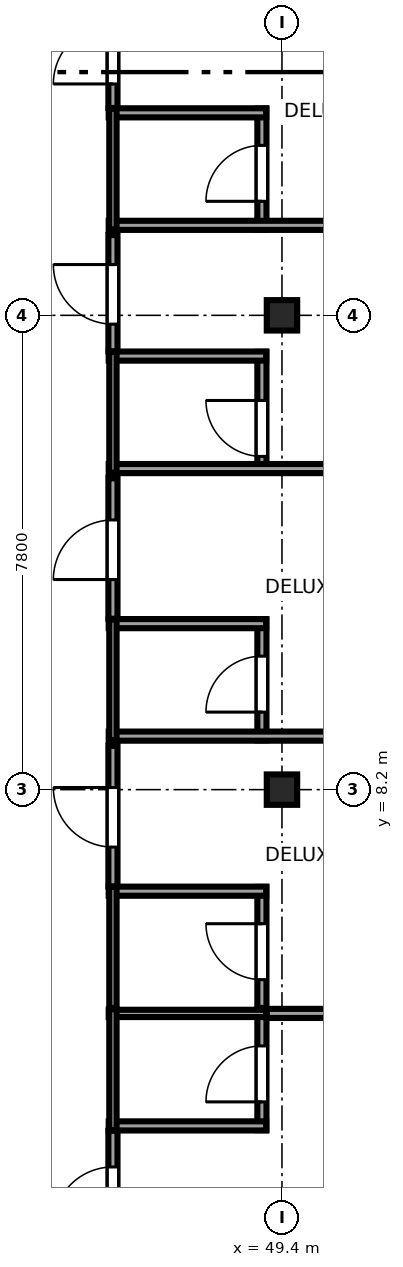
"""IFC4 building model, lengths in metres.
Left out: names, types, materials, properties, quantities, classifications, styles, units other than length and angle.
Written with IfcOpenShell. Run it as: python <this file> out.ifc"""

import sys

from ifc_helpers import new_model, si_unit, direction, frame, frame_2d, origin, origin_2d, place, context, subcontext, project, spatial, rectangle, i_section, extrude, source, transform, mapped, element, fill, save


model = new_model("IFC4")
c1 = context("Model", 3, precision=1e-05, world=origin(), true_north=direction((0.0, 1.0)))
c2 = subcontext(c1, "Body", "Model", "MODEL_VIEW")
j1 = project(units=[si_unit("LENGTHUNIT", "METRE"), si_unit("PLANEANGLEUNIT", "RADIAN")], contexts=[c1])
p1 = place(None, origin())
s1 = spatial("IfcSite", under=j1, at=p1, CompositionType="ELEMENT")
p2 = place(p1, origin())
s2 = spatial("IfcBuilding", under=s1, at=p2, CompositionType="ELEMENT")
p3 = place(p2, frame((0.0, 0.0, 32.0)))
s3 = spatial("IfcBuildingStorey", under=s2, at=p3, CompositionType="ELEMENT", Elevation=32.0)
m1 = source(origin(), c2, "Body", "SweptSolid", [
    extrude(i_section(OverallWidth=0.5, OverallDepth=0.5, WebThickness=0.028, FlangeThickness=0.045, at=origin_2d()), origin(), (0.0, 0.0, 1.0), 3.55),
])
for number, where, z_axis, x_axis in (
    (1, (49.4, 8.2, 0.0), (0.0, 0.0, 1.0), (1.0, 0.0, 0.0)),
    (2, (49.4, 16.0, 0.0), (0.0, 0.0, 1.0), (1.0, 0.0, 0.0)),
):
    element("IfcColumn", number, at=place(p3, frame(where, z_axis=z_axis, x_axis=x_axis)), inside=s3, PredefinedType="COLUMN", context=c2, shape_type="MappedRepresentation", body=[
        mapped(m1, transform((0.0, 0.0, 0.0), x_axis=(1.0, 0.0, 0.0), y_axis=(0.0, 1.0, 0.0), z_axis=(0.0, 0.0, 1.0), scale=1.0)),
    ])
p4 = place(p3, frame((49.07, 2.6, 0.0), z_axis=(0.0, 0.0, 1.0), x_axis=(0.0, 1.0, 0.0)))
e3 = element("IfcWall", 3, at=p4, inside=s3, PredefinedType="PARTITIONING", context=c2, shape_type="SweptSolid", body=[
    extrude(rectangle(XDim=1.99, YDim=0.15, at=frame_2d((0.995, 0.0))), origin(), (0.0, 0.0, 1.0), 3.37),
])
p5 = place(p4, frame((0.465, 0.0, 0.0)))
e4 = element("IfcOpeningElement", 4, at=p5, cuts=e3, PredefinedType="OPENING", context=c2, shape_type="SweptSolid", body=[
    extrude(rectangle(XDim=0.92, YDim=2.01, at=frame_2d((0.46, 1.005))), frame((0.0, 0.085, 0.0), z_axis=(0.0, -1.0, 0.0), x_axis=(1.0, 0.0, 0.0)), (0.0, 0.0, 1.0), 0.17),
])
p6 = place(p3, frame((46.55, 2.67, 0.0), z_axis=(0.0, 0.0, 1.0), x_axis=(1.0, 0.0, 0.0)))
e5 = element("IfcWall", 5, at=p6, inside=s3, PredefinedType="PARTITIONING", context=c2, shape_type="SweptSolid", body=[
    extrude(rectangle(XDim=2.59, YDim=0.15, at=frame_2d((1.295, 0.0))), origin(), (0.0, 0.0, 1.0), 3.37),
])
p7 = place(p3, frame((46.55, 4.52, 0.0), z_axis=(0.0, 0.0, 1.0), x_axis=(1.0, 0.0, 0.0)))
e6 = element("IfcWall", 6, at=p7, inside=s3, PredefinedType="PLUMBINGWALL", context=c2, shape_type="SweptSolid", body=[
    extrude(rectangle(XDim=2.59, YDim=0.12, at=frame_2d((1.295, 0.0))), origin(), (0.0, 0.0, 1.0), 3.37),
])
p8 = place(p3, frame((46.62, 2.6, 0.0), z_axis=(0.0, 0.0, 1.0), x_axis=(0.0, 1.0, 0.0)))
e7 = element("IfcWall", 7, at=p8, inside=s3, PredefinedType="PLUMBINGWALL", context=c2, shape_type="SweptSolid", body=[
    extrude(rectangle(XDim=1.99, YDim=0.12, at=frame_2d((0.995, 0.0))), origin(), (0.0, 0.0, 1.0), 3.37),
])
p9 = place(p3, frame((49.07, 4.61, 0.0), z_axis=(0.0, 0.0, 1.0), x_axis=(0.0, 1.0, 0.0)))
e8 = element("IfcWall", 8, at=p9, inside=s3, PredefinedType="PARTITIONING", context=c2, shape_type="SweptSolid", body=[
    extrude(rectangle(XDim=1.99, YDim=0.15, at=frame_2d((0.995, 0.0))), origin(), (0.0, 0.0, 1.0), 3.37),
])
p10 = place(p9, frame((0.465, 0.0, 0.0)))
e9 = element("IfcOpeningElement", 9, at=p10, cuts=e8, PredefinedType="OPENING", context=c2, shape_type="SweptSolid", body=[
    extrude(rectangle(XDim=0.92, YDim=2.01, at=frame_2d((0.46, 1.005))), frame((0.0, 0.085, 0.0), z_axis=(0.0, -1.0, 0.0), x_axis=(1.0, 0.0, 0.0)), (0.0, 0.0, 1.0), 0.17),
])
p11 = place(p3, frame((46.55, 6.53, 0.0), z_axis=(0.0, 0.0, 1.0), x_axis=(1.0, 0.0, 0.0)))
e10 = element("IfcWall", 10, at=p11, inside=s3, PredefinedType="PARTITIONING", context=c2, shape_type="SweptSolid", body=[
    extrude(rectangle(XDim=2.59, YDim=0.15, at=frame_2d((1.295, 0.0))), origin(), (0.0, 0.0, 1.0), 3.37),
])
p12 = place(p3, frame((46.62, 4.61, 0.0), z_axis=(0.0, 0.0, 1.0), x_axis=(0.0, 1.0, 0.0)))
e11 = element("IfcWall", 11, at=p12, inside=s3, PredefinedType="PLUMBINGWALL", context=c2, shape_type="SweptSolid", body=[
    extrude(rectangle(XDim=1.99, YDim=0.12, at=frame_2d((0.995, 0.0))), origin(), (0.0, 0.0, 1.0), 3.37),
])
p13 = place(p3, frame((49.07, 9.01, 0.0), z_axis=(0.0, 0.0, 1.0), x_axis=(0.0, 1.0, 0.0)))
e12 = element("IfcWall", 12, at=p13, inside=s3, PredefinedType="PARTITIONING", context=c2, shape_type="SweptSolid", body=[
    extrude(rectangle(XDim=1.99, YDim=0.15, at=frame_2d((0.995, 0.0))), origin(), (0.0, 0.0, 1.0), 3.37),
])
p14 = place(p13, frame((0.465, 0.0, 0.0)))
e13 = element("IfcOpeningElement", 13, at=p14, cuts=e12, PredefinedType="OPENING", context=c2, shape_type="SweptSolid", body=[
    extrude(rectangle(XDim=0.92, YDim=2.01, at=frame_2d((0.46, 1.005))), frame((0.0, 0.085, 0.0), z_axis=(0.0, -1.0, 0.0), x_axis=(1.0, 0.0, 0.0)), (0.0, 0.0, 1.0), 0.17),
])
p15 = place(p3, frame((46.55, 9.08, 0.0), z_axis=(0.0, 0.0, 1.0), x_axis=(1.0, 0.0, 0.0)))
e14 = element("IfcWall", 14, at=p15, inside=s3, PredefinedType="PARTITIONING", context=c2, shape_type="SweptSolid", body=[
    extrude(rectangle(XDim=10.045, YDim=0.15, at=frame_2d((5.022, 0.0))), origin(), (0.0, 0.0, 1.0), 3.37),
])
p16 = place(p3, frame((46.55, 10.93, 0.0), z_axis=(0.0, 0.0, 1.0), x_axis=(1.0, 0.0, 0.0)))
e15 = element("IfcWall", 15, at=p16, inside=s3, PredefinedType="PARTITIONING", context=c2, shape_type="SweptSolid", body=[
    extrude(rectangle(XDim=2.59, YDim=0.15, at=frame_2d((1.295, 0.0))), origin(), (0.0, 0.0, 1.0), 3.37),
])
p17 = place(p3, frame((46.62, 9.01, 0.0), z_axis=(0.0, 0.0, 1.0), x_axis=(0.0, 1.0, 0.0)))
e16 = element("IfcWall", 16, at=p17, inside=s3, PredefinedType="PLUMBINGWALL", context=c2, shape_type="SweptSolid", body=[
    extrude(rectangle(XDim=1.99, YDim=0.12, at=frame_2d((0.995, 0.0))), origin(), (0.0, 0.0, 1.0), 3.37),
])
p18 = place(p3, frame((49.07, 13.41, 0.0), z_axis=(0.0, 0.0, 1.0), x_axis=(0.0, 1.0, 0.0)))
e17 = element("IfcWall", 17, at=p18, inside=s3, PredefinedType="PARTITIONING", context=c2, shape_type="SweptSolid", body=[
    extrude(rectangle(XDim=1.99, YDim=0.15, at=frame_2d((0.995, 0.0))), origin(), (0.0, 0.0, 1.0), 3.37),
])
p19 = place(p18, frame((0.27, 0.0, 0.0)))
e18 = element("IfcOpeningElement", 18, at=p19, cuts=e17, PredefinedType="OPENING", context=c2, shape_type="SweptSolid", body=[
    extrude(rectangle(XDim=0.92, YDim=2.01, at=frame_2d((0.46, 1.005))), frame((0.0, 0.085, 0.0), z_axis=(0.0, -1.0, 0.0), x_axis=(1.0, 0.0, 0.0)), (0.0, 0.0, 1.0), 0.17),
])
p20 = place(p3, frame((46.55, 13.48, 0.0), z_axis=(0.0, 0.0, 1.0), x_axis=(1.0, 0.0, 0.0)))
e19 = element("IfcWall", 19, at=p20, inside=s3, PredefinedType="PARTITIONING", context=c2, shape_type="SweptSolid", body=[
    extrude(rectangle(XDim=10.045, YDim=0.15, at=frame_2d((5.022, 0.0))), origin(), (0.0, 0.0, 1.0), 3.37),
])
p21 = place(p3, frame((46.55, 15.33, 0.0), z_axis=(0.0, 0.0, 1.0), x_axis=(1.0, 0.0, 0.0)))
e20 = element("IfcWall", 20, at=p21, inside=s3, PredefinedType="PARTITIONING", context=c2, shape_type="SweptSolid", body=[
    extrude(rectangle(XDim=2.59, YDim=0.15, at=frame_2d((1.295, 0.0))), origin(), (0.0, 0.0, 1.0), 3.37),
])
p22 = place(p3, frame((46.62, 13.41, 0.0), z_axis=(0.0, 0.0, 1.0), x_axis=(0.0, 1.0, 0.0)))
e21 = element("IfcWall", 21, at=p22, inside=s3, PredefinedType="PLUMBINGWALL", context=c2, shape_type="SweptSolid", body=[
    extrude(rectangle(XDim=1.99, YDim=0.12, at=frame_2d((0.995, 0.0))), origin(), (0.0, 0.0, 1.0), 3.37),
])
p23 = place(p3, frame((49.07, 17.41, 0.0), z_axis=(0.0, 0.0, 1.0), x_axis=(0.0, 1.0, 0.0)))
e22 = element("IfcWall", 22, at=p23, inside=s3, PredefinedType="PARTITIONING", context=c2, shape_type="SweptSolid", body=[
    extrude(rectangle(XDim=1.99, YDim=0.15, at=frame_2d((0.995, 0.0))), origin(), (0.0, 0.0, 1.0), 3.37),
])
p24 = place(p23, frame((0.465, 0.0, 0.0)))
e23 = element("IfcOpeningElement", 23, at=p24, cuts=e22, PredefinedType="OPENING", context=c2, shape_type="SweptSolid", body=[
    extrude(rectangle(XDim=0.92, YDim=2.01, at=frame_2d((0.46, 1.005))), frame((0.0, 0.085, 0.0), z_axis=(0.0, -1.0, 0.0), x_axis=(1.0, 0.0, 0.0)), (0.0, 0.0, 1.0), 0.17),
])
p25 = place(p3, frame((46.55, 17.48, 0.0), z_axis=(0.0, 0.0, 1.0), x_axis=(1.0, 0.0, 0.0)))
e24 = element("IfcWall", 24, at=p25, inside=s3, PredefinedType="PARTITIONING", context=c2, shape_type="SweptSolid", body=[
    extrude(rectangle(XDim=10.045, YDim=0.15, at=frame_2d((5.022, 0.0))), origin(), (0.0, 0.0, 1.0), 3.37),
])
p26 = place(p3, frame((46.55, 19.33, 0.0), z_axis=(0.0, 0.0, 1.0), x_axis=(1.0, 0.0, 0.0)))
e25 = element("IfcWall", 25, at=p26, inside=s3, PredefinedType="PARTITIONING", context=c2, shape_type="SweptSolid", body=[
    extrude(rectangle(XDim=2.59, YDim=0.15, at=frame_2d((1.295, 0.0))), origin(), (0.0, 0.0, 1.0), 3.37),
])
p27 = place(p3, frame((46.62, 17.41, 0.0), z_axis=(0.0, 0.0, 1.0), x_axis=(0.0, 1.0, 0.0)))
e26 = element("IfcWall", 26, at=p27, inside=s3, PredefinedType="PLUMBINGWALL", context=c2, shape_type="SweptSolid", body=[
    extrude(rectangle(XDim=1.99, YDim=0.12, at=frame_2d((0.995, 0.0))), origin(), (0.0, 0.0, 1.0), 3.37),
])
p28 = place(p3, frame((46.62, 0.405, 0.0), z_axis=(0.0, 0.0, 1.0), x_axis=(0.0, 1.0, 0.0)))
e27 = element("IfcWall", 27, at=p28, inside=s3, PredefinedType="PARTITIONING", context=c2, shape_type="SweptSolid", body=[
    extrude(rectangle(XDim=2.185, YDim=0.15, at=frame_2d((1.093, 0.0))), origin(), (0.0, 0.0, 1.0), 3.37),
])
p29 = place(p28, frame((0.61, 0.0, 0.0)))
e28 = element("IfcOpeningElement", 28, at=p29, cuts=e27, PredefinedType="OPENING", context=c2, shape_type="SweptSolid", body=[
    extrude(rectangle(XDim=0.98, YDim=2.12, at=frame_2d((0.49, 1.06))), frame((0.0, 0.085, 0.0), z_axis=(0.0, -1.0, 0.0), x_axis=(1.0, 0.0, 0.0)), (0.0, 0.0, 1.0), 0.17),
])
p30 = place(p3, frame((49.15, 4.52, 0.0), z_axis=(0.0, 0.0, 1.0), x_axis=(1.0, 0.0, 0.0)))
e29 = element("IfcWall", 29, at=p30, inside=s3, PredefinedType="PARTITIONING", context=c2, shape_type="SweptSolid", body=[
    extrude(rectangle(XDim=7.445, YDim=0.15, at=frame_2d((3.723, 0.0))), origin(), (0.0, 0.0, 1.0), 3.37),
])
p31 = place(p3, frame((46.62, 6.61, 0.0), z_axis=(0.0, 0.0, 1.0), x_axis=(0.0, 1.0, 0.0)))
e30 = element("IfcWall", 30, at=p31, inside=s3, PredefinedType="PARTITIONING", context=c2, shape_type="SweptSolid", body=[
    extrude(rectangle(XDim=2.31, YDim=0.15, at=frame_2d((1.155, 0.0))), origin(), (0.0, 0.0, 1.0), 3.37),
])
p32 = place(p31, frame((0.645, 0.0, 0.0)))
e31 = element("IfcOpeningElement", 31, at=p32, cuts=e30, PredefinedType="OPENING", context=c2, shape_type="SweptSolid", body=[
    extrude(rectangle(XDim=0.98, YDim=2.12, at=frame_2d((0.49, 1.06))), frame((0.0, 0.085, 0.0), z_axis=(0.0, -1.0, 0.0), x_axis=(1.0, 0.0, 0.0)), (0.0, 0.0, 1.0), 0.17),
])
p33 = place(p3, frame((46.62, 11.01, 0.0), z_axis=(0.0, 0.0, 1.0), x_axis=(0.0, 1.0, 0.0)))
e32 = element("IfcWall", 32, at=p33, inside=s3, PredefinedType="PARTITIONING", context=c2, shape_type="SweptSolid", body=[
    extrude(rectangle(XDim=2.31, YDim=0.15, at=frame_2d((1.155, 0.0))), origin(), (0.0, 0.0, 1.0), 3.37),
])
p34 = place(p33, frame((0.645, 0.0, 0.0)))
e33 = element("IfcOpeningElement", 33, at=p34, cuts=e32, PredefinedType="OPENING", context=c2, shape_type="SweptSolid", body=[
    extrude(rectangle(XDim=0.98, YDim=2.12, at=frame_2d((0.49, 1.06))), frame((0.0, 0.085, 0.0), z_axis=(0.0, -1.0, 0.0), x_axis=(1.0, 0.0, 0.0)), (0.0, 0.0, 1.0), 0.17),
])
p35 = place(p3, frame((46.62, 15.41, 0.0), z_axis=(0.0, 0.0, 1.0), x_axis=(0.0, 1.0, 0.0)))
e34 = element("IfcWall", 34, at=p35, inside=s3, PredefinedType="PARTITIONING", context=c2, shape_type="SweptSolid", body=[
    extrude(rectangle(XDim=1.91, YDim=0.15, at=frame_2d((0.955, 0.0))), origin(), (0.0, 0.0, 1.0), 3.37),
])
p36 = place(p35, frame((0.445, 0.0, 0.0)))
e35 = element("IfcOpeningElement", 35, at=p36, cuts=e34, PredefinedType="OPENING", context=c2, shape_type="SweptSolid", body=[
    extrude(rectangle(XDim=0.98, YDim=2.12, at=frame_2d((0.49, 1.06))), frame((0.0, 0.085, 0.0), z_axis=(0.0, -1.0, 0.0), x_axis=(1.0, 0.0, 0.0)), (0.0, 0.0, 1.0), 0.17),
])
p37 = place(p3, frame((46.62, 19.41, 0.0), z_axis=(0.0, 0.0, 1.0), x_axis=(0.0, 1.0, 0.0)))
e36 = element("IfcWall", 36, at=p37, inside=s3, PredefinedType="PARTITIONING", context=c2, shape_type="SweptSolid", body=[
    extrude(rectangle(XDim=1.81, YDim=0.15, at=frame_2d((0.905, 0.0))), origin(), (0.0, 0.0, 1.0), 3.37),
])
p38 = place(p37, frame((0.395, 0.0, 0.0)))
e37 = element("IfcOpeningElement", 37, at=p38, cuts=e36, PredefinedType="OPENING", context=c2, shape_type="SweptSolid", body=[
    extrude(rectangle(XDim=0.98, YDim=2.12, at=frame_2d((0.49, 1.06))), frame((0.0, 0.085, 0.0), z_axis=(0.0, -1.0, 0.0), x_axis=(1.0, 0.0, 0.0)), (0.0, 0.0, 1.0), 0.17),
])
m2 = source(origin(), c2, "Body", "SweptSolid", [
    extrude(rectangle(XDim=0.92, YDim=2.01, at=frame_2d((0.46, 1.005))), frame((0.0, 0.025, 0.0), z_axis=(0.0, -1.0, 0.0), x_axis=(1.0, 0.0, 0.0)), (0.0, 0.0, 1.0), 0.05),
])
p39 = place(p5, origin())
e38 = element("IfcDoor", 38, at=p39, inside=s3, OperationType="SINGLE_SWING_LEFT", PredefinedType="DOOR", context=c2, shape_type="MappedRepresentation", body=[
    mapped(m2, transform((0.0, 0.0, 0.0), x_axis=(1.0, 0.0, 0.0), y_axis=(0.0, 1.0, 0.0), z_axis=(0.0, 0.0, 1.0), scale=1.0)),
])
fill(e4, e38)
p40 = place(p10, origin())
e39 = element("IfcDoor", 39, at=p40, inside=s3, OperationType="SINGLE_SWING_RIGHT", PredefinedType="DOOR", context=c2, shape_type="MappedRepresentation", body=[
    mapped(m2, transform((0.0, 0.0, 0.0), x_axis=(1.0, 0.0, 0.0), y_axis=(0.0, 1.0, 0.0), z_axis=(0.0, 0.0, 1.0), scale=1.0)),
])
fill(e9, e39)
p41 = place(p14, origin())
e40 = element("IfcDoor", 40, at=p41, inside=s3, OperationType="SINGLE_SWING_LEFT", PredefinedType="DOOR", context=c2, shape_type="MappedRepresentation", body=[
    mapped(m2, transform((0.0, 0.0, 0.0), x_axis=(1.0, 0.0, 0.0), y_axis=(0.0, 1.0, 0.0), z_axis=(0.0, 0.0, 1.0), scale=1.0)),
])
fill(e13, e40)
p42 = place(p19, origin())
e41 = element("IfcDoor", 41, at=p42, inside=s3, OperationType="SINGLE_SWING_RIGHT", PredefinedType="DOOR", context=c2, shape_type="MappedRepresentation", body=[
    mapped(m2, transform((0.0, 0.0, 0.0), x_axis=(1.0, 0.0, 0.0), y_axis=(0.0, 1.0, 0.0), z_axis=(0.0, 0.0, 1.0), scale=1.0)),
])
fill(e18, e41)
p43 = place(p24, origin())
e42 = element("IfcDoor", 42, at=p43, inside=s3, OperationType="SINGLE_SWING_LEFT", PredefinedType="DOOR", context=c2, shape_type="MappedRepresentation", body=[
    mapped(m2, transform((0.0, 0.0, 0.0), x_axis=(1.0, 0.0, 0.0), y_axis=(0.0, 1.0, 0.0), z_axis=(0.0, 0.0, 1.0), scale=1.0)),
])
fill(e23, e42)
m3 = source(origin(), c2, "Body", "SweptSolid", [
    extrude(rectangle(XDim=0.98, YDim=2.12, at=frame_2d((0.49, 1.06))), frame((0.0, 0.025, 0.0), z_axis=(0.0, -1.0, 0.0), x_axis=(1.0, 0.0, 0.0)), (0.0, 0.0, 1.0), 0.05),
])
p44 = place(p29, origin())
e43 = element("IfcDoor", 43, at=p44, inside=s3, OperationType="SINGLE_SWING_LEFT", PredefinedType="DOOR", context=c2, shape_type="MappedRepresentation", body=[
    mapped(m3, transform((0.0, 0.0, 0.0), x_axis=(1.0, 0.0, 0.0), y_axis=(0.0, 1.0, 0.0), z_axis=(0.0, 0.0, 1.0), scale=1.0)),
])
fill(e28, e43)
p45 = place(p32, origin())
e44 = element("IfcDoor", 44, at=p45, inside=s3, OperationType="SINGLE_SWING_RIGHT", PredefinedType="DOOR", context=c2, shape_type="MappedRepresentation", body=[
    mapped(m3, transform((0.0, 0.0, 0.0), x_axis=(1.0, 0.0, 0.0), y_axis=(0.0, 1.0, 0.0), z_axis=(0.0, 0.0, 1.0), scale=1.0)),
])
fill(e31, e44)
p46 = place(p34, origin())
e45 = element("IfcDoor", 45, at=p46, inside=s3, OperationType="SINGLE_SWING_LEFT", PredefinedType="DOOR", context=c2, shape_type="MappedRepresentation", body=[
    mapped(m3, transform((0.0, 0.0, 0.0), x_axis=(1.0, 0.0, 0.0), y_axis=(0.0, 1.0, 0.0), z_axis=(0.0, 0.0, 1.0), scale=1.0)),
])
fill(e33, e45)
p47 = place(p36, origin())
e46 = element("IfcDoor", 46, at=p47, inside=s3, OperationType="SINGLE_SWING_RIGHT", PredefinedType="DOOR", context=c2, shape_type="MappedRepresentation", body=[
    mapped(m3, transform((0.0, 0.0, 0.0), x_axis=(1.0, 0.0, 0.0), y_axis=(0.0, 1.0, 0.0), z_axis=(0.0, 0.0, 1.0), scale=1.0)),
])
fill(e35, e46)
p48 = place(p38, origin())
e47 = element("IfcDoor", 47, at=p48, inside=s3, OperationType="SINGLE_SWING_LEFT", PredefinedType="DOOR", context=c2, shape_type="MappedRepresentation", body=[
    mapped(m3, transform((0.0, 0.0, 0.0), x_axis=(1.0, 0.0, 0.0), y_axis=(0.0, 1.0, 0.0), z_axis=(0.0, 0.0, 1.0), scale=1.0)),
])
fill(e37, e47)
save(model, sys.argv[1])
